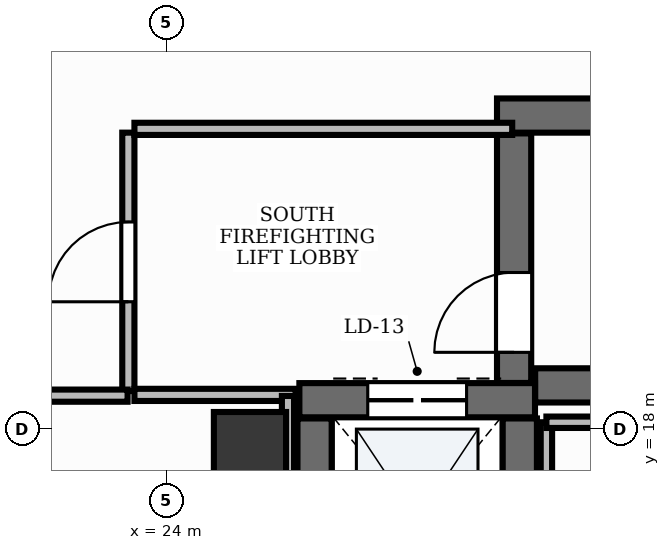
"""IFC4 building model, lengths in metres.
Left out: names, types, materials, properties, quantities, classifications, styles, units other than length and angle.
Written with IfcOpenShell. Run it as: python <this file> out.ifc"""

import sys

from ifc_helpers import new_model, si_unit, direction, frame, frame_2d, origin, origin_2d, place, context, subcontext, project, spatial, rectangle, extrude, element, fill, save


model = new_model("IFC4")
c1 = context("Model", 3, precision=1e-05, world=origin(), true_north=direction((0.0, 1.0)))
c2 = subcontext(c1, "Body", "Model", "MODEL_VIEW")
j1 = project(units=[si_unit("LENGTHUNIT", "METRE"), si_unit("PLANEANGLEUNIT", "RADIAN")], contexts=[c1])
p1 = place(None, origin())
s1 = spatial("IfcSite", under=j1, at=p1, CompositionType="ELEMENT")
p2 = place(p1, origin())
s2 = spatial("IfcBuilding", under=s1, at=p2, CompositionType="ELEMENT")
p3 = place(p2, frame((0.0, 0.0, 63.6)))
s3 = spatial("IfcBuildingStorey", under=s2, at=p3, CompositionType="ELEMENT", Elevation=63.6)
p4 = place(p3, frame((28.852, 18.575, 0.0), z_axis=(0.0, 0.0, 1.0), x_axis=(1.0, 0.0, 0.0)))
e1 = element("IfcWall", 1, at=p4, inside=s3, PredefinedType="SHEAR", context=c2, shape_type="SweptSolid", body=[
    extrude(rectangle(XDim=8.248, YDim=0.45, at=frame_2d((4.124, 0.0))), origin(), (0.0, 0.0, 1.0), 3.9),
])
p5 = place(p3, frame((28.35, 22.125, 0.0), z_axis=(0.0, 0.0, 1.0), x_axis=(1.0, 0.0, 0.0)))
e2 = element("IfcWall", 2, at=p5, inside=s3, PredefinedType="SHEAR", context=c2, shape_type="SweptSolid", body=[
    extrude(rectangle(XDim=8.75, YDim=0.45, at=frame_2d((4.375, 0.0))), origin(), (0.0, 0.0, 1.0), 3.9),
])
p6 = place(p3, frame((28.575, 18.607, 0.0), z_axis=(0.0, 0.0, 1.0), x_axis=(0.0, 1.0, 0.0)))
e3 = element("IfcWall", 3, at=p6, inside=s3, PredefinedType="SHEAR", context=c2, shape_type="SweptSolid", body=[
    extrude(rectangle(XDim=3.283, YDim=0.45, at=frame_2d((1.642, 0.0))), origin(), (0.0, 0.0, 1.0), 3.9),
])
p7 = place(p6, frame((0.403, 0.0, 0.0)))
e4 = element("IfcOpeningElement", 4, at=p7, cuts=e3, PredefinedType="OPENING", context=c2, shape_type="SweptSolid", body=[
    extrude(rectangle(XDim=1.05, YDim=2.15, at=frame_2d((0.525, 1.075))), frame((0.0, 0.24, 0.0), z_axis=(0.0, -1.0, 0.0), x_axis=(1.0, 0.0, 0.0)), (0.0, 0.0, 1.0), 0.48),
])
p8 = place(p3, frame((25.75, 18.38, 0.0), z_axis=(0.0, 0.0, 1.0), x_axis=(1.0, 0.0, 0.0)))
e5 = element("IfcWall", 5, at=p8, inside=s3, PredefinedType="SHEAR", context=c2, shape_type="SweptSolid", body=[
    extrude(rectangle(XDim=3.1, YDim=0.45, at=frame_2d((1.55, 0.0))), origin(), (0.0, 0.0, 1.0), 3.9),
])
p9 = place(p8, frame((0.9, 0.0, 0.0)))
e6 = element("IfcOpeningElement", 6, at=p9, cuts=e5, PredefinedType="OPENING", context=c2, shape_type="SweptSolid", body=[
    extrude(rectangle(XDim=1.3, YDim=2.2, at=frame_2d((0.65, 1.1))), frame((0.0, 0.24, 0.0), z_axis=(0.0, -1.0, 0.0), x_axis=(1.0, 0.0, 0.0)), (0.0, 0.0, 1.0), 0.48),
])
for number, where, z_axis, x_axis in (
    (7, (25.95, 15.44, 0.0), (0.0, 0.0, 1.0), (0.0, 1.0, 0.0)),
    (8, (28.65, 15.44, 0.0), (0.0, 0.0, 1.0), (0.0, 1.0, 0.0)),
):
    element("IfcWall", number, at=place(p3, frame(where, z_axis=z_axis, x_axis=x_axis)), inside=s3, PredefinedType="SHEAR", context=c2, shape_type="SweptSolid", body=[
        extrude(rectangle(XDim=2.7, YDim=0.45, at=frame_2d((1.35, 0.0))), origin(), (0.0, 0.0, 1.0), 3.9),
    ])
p10 = place(p3, frame((25.1, 17.75, -0.0), z_axis=(0.0, 0.0, 1.0), x_axis=(1.0, 0.0, 0.0)))
e9 = element("IfcColumn", 9, at=p10, inside=s3, PredefinedType="PILASTER", context=c2, shape_type="SweptSolid", body=[
    extrude(rectangle(XDim=0.95, YDim=0.95, at=origin_2d()), origin(), (0.0, 0.0, 1.0), 3.901),
])
p11 = place(p3, frame((23.5, 18.5, 0.0), z_axis=(0.0, 0.0, 1.0), x_axis=(0.0, 1.0, 0.0)))
e10 = element("IfcWall", 10, at=p11, inside=s3, PredefinedType="PARTITIONING", context=c2, shape_type="SweptSolid", body=[
    extrude(rectangle(XDim=3.4, YDim=0.16, at=frame_2d((1.7, 0.0))), origin(), (0.0, 0.0, 1.0), 2.91),
])
p12 = place(p11, frame((1.175, 0.0, 0.0)))
e11 = element("IfcOpeningElement", 11, at=p12, cuts=e10, PredefinedType="OPENING", context=c2, shape_type="SweptSolid", body=[
    extrude(rectangle(XDim=1.05, YDim=2.15, at=frame_2d((0.525, 1.075))), frame((0.0, 0.095, 0.0), z_axis=(0.0, -1.0, 0.0), x_axis=(1.0, 0.0, 0.0)), (0.0, 0.0, 1.0), 0.19),
])
p13 = place(p3, frame((23.58, 21.95, 0.0), z_axis=(0.0, 0.0, 1.0), x_axis=(1.0, 0.0, 0.0)))
e12 = element("IfcWall", 12, at=p13, inside=s3, PredefinedType="PARTITIONING", context=c2, shape_type="SweptSolid", body=[
    extrude(rectangle(XDim=4.97, YDim=0.16, at=frame_2d((2.485, 0.0))), origin(), (0.0, 0.0, 1.0), 2.91),
])
p14 = place(p3, frame((23.58, 18.45, 0.0), z_axis=(0.0, 0.0, 1.0), x_axis=(1.0, 0.0, 0.0)))
e13 = element("IfcWall", 13, at=p14, inside=s3, PredefinedType="PARTITIONING", context=c2, shape_type="SweptSolid", body=[
    extrude(rectangle(XDim=2.12, YDim=0.16, at=frame_2d((1.06, 0.0))), origin(), (0.0, 0.0, 1.0), 2.91),
])
p15 = place(p3, frame((11.59, 18.44, 0.0), z_axis=(0.0, 0.0, 1.0), x_axis=(1.0, 0.0, 0.0)))
e14 = element("IfcWall", 14, at=p15, inside=s3, PredefinedType="PARTITIONING", context=c2, shape_type="SweptSolid", body=[
    extrude(rectangle(XDim=11.9, YDim=0.16, at=frame_2d((5.95, 0.0))), origin(), (0.0, 0.0, 1.0), 2.91),
])
p16 = place(p15, frame((0.24, 0.0, 0.0)))
e15 = element("IfcOpeningElement", 15, at=p16, cuts=e14, PredefinedType="OPENING", context=c2, shape_type="SweptSolid", body=[
    extrude(rectangle(XDim=0.95, YDim=2.15, at=frame_2d((0.475, 1.075))), frame((0.0, 0.095, 0.0), z_axis=(0.0, -1.0, 0.0), x_axis=(1.0, 0.0, 0.0)), (0.0, 0.0, 1.0), 0.19),
])
p17 = place(p3, frame((25.6, 18.436, 0.0), z_axis=(0.0, 0.0, 1.0), x_axis=(0.0, -1.0, 0.0)))
e16 = element("IfcWall", 16, at=p17, inside=s3, PredefinedType="PARTITIONING", context=c2, shape_type="SweptSolid", body=[
    extrude(rectangle(XDim=2.934, YDim=0.16, at=frame_2d((1.467, 0.0))), origin(), (0.0, 0.0, 1.0), 2.91),
])
p18 = place(p3, frame((29.0, 15.502, 0.0), z_axis=(0.0, 0.0, 1.0), x_axis=(0.0, 1.0, 0.0)))
e17 = element("IfcWall", 17, at=p18, inside=s3, PredefinedType="PARTITIONING", context=c2, shape_type="SweptSolid", body=[
    extrude(rectangle(XDim=2.588, YDim=0.15, at=frame_2d((1.294, 0.0))), origin(), (0.0, 0.0, 1.0), 2.91),
])
p19 = place(p3, frame((29.0, 18.09, 0.0), z_axis=(0.0, 0.0, 1.0), x_axis=(1.0, 0.0, 0.0)))
e18 = element("IfcWall", 18, at=p19, inside=s3, PredefinedType="PARTITIONING", context=c2, shape_type="SweptSolid", body=[
    extrude(rectangle(XDim=8.35, YDim=0.15, at=frame_2d((4.175, 0.0))), origin(), (0.0, 0.0, 1.0), 2.91),
])
p20 = place(p7, origin())
e19 = element("IfcDoor", 19, at=p20, inside=s3, OperationType="SINGLE_SWING_LEFT", PredefinedType="DOOR", context=c2, shape_type="SweptSolid", body=[
    extrude(rectangle(XDim=1.05, YDim=2.15, at=frame_2d((0.525, 1.075))), frame((0.0, 0.025, 0.0), z_axis=(0.0, -1.0, 0.0), x_axis=(1.0, 0.0, 0.0)), (0.0, 0.0, 1.0), 0.05),
])
fill(e4, e19)
p21 = place(p9, origin())
e20 = element("IfcDoor", 20, at=p21, inside=s3, OperationType="DOUBLE_DOOR_SLIDING", PredefinedType="DOOR", context=c2, shape_type="SweptSolid", body=[
    extrude(rectangle(XDim=1.3, YDim=2.2, at=frame_2d((0.65, 1.1))), frame((0.0, 0.025, 0.0), z_axis=(0.0, -1.0, 0.0), x_axis=(1.0, 0.0, 0.0)), (0.0, 0.0, 1.0), 0.05),
])
fill(e6, e20)
p22 = place(p12, origin())
e21 = element("IfcDoor", 21, at=p22, inside=s3, OperationType="SINGLE_SWING_LEFT", PredefinedType="DOOR", context=c2, shape_type="SweptSolid", body=[
    extrude(rectangle(XDim=1.05, YDim=2.15, at=frame_2d((0.525, 1.075))), frame((0.0, 0.025, 0.0), z_axis=(0.0, -1.0, 0.0), x_axis=(1.0, 0.0, 0.0)), (0.0, 0.0, 1.0), 0.05),
])
fill(e11, e21)
save(model, sys.argv[1])
